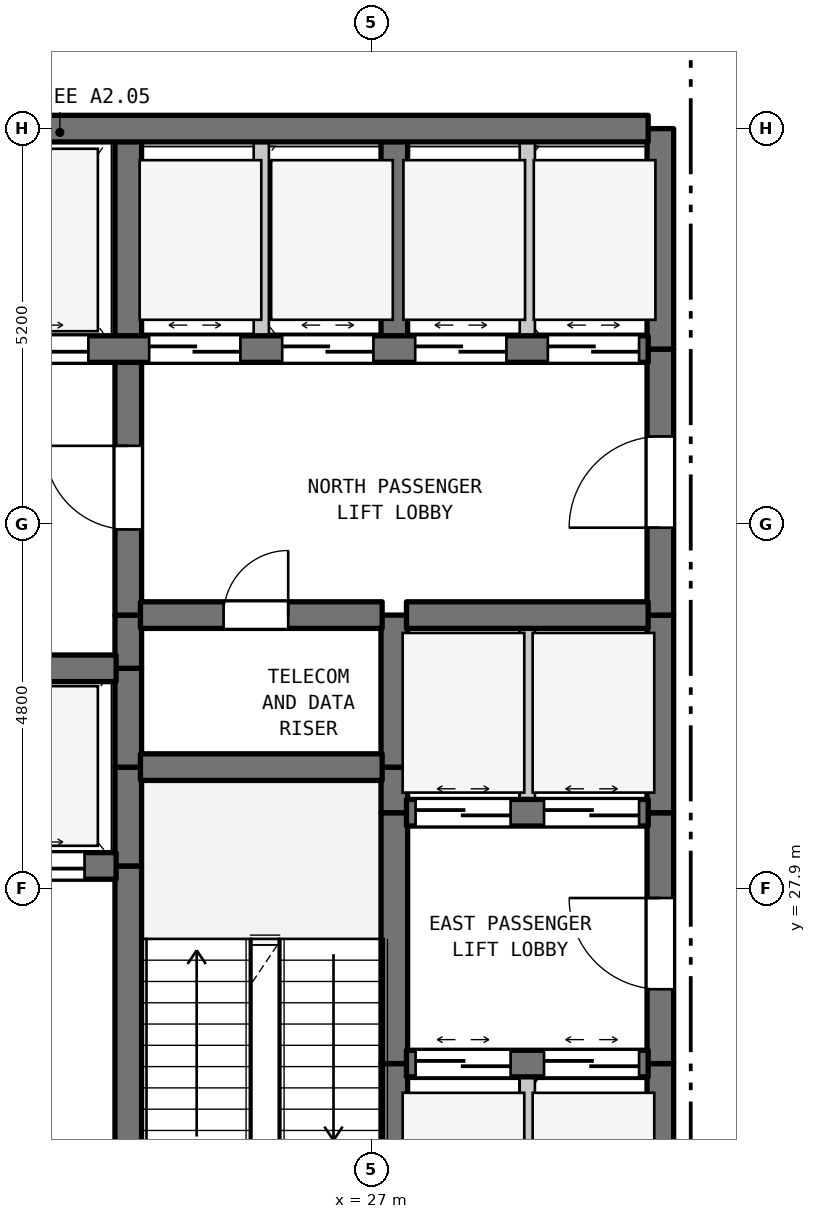
"""IFC4 building model, lengths in metres.
Left out: names, types, materials, properties, quantities, classifications, styles, units other than length and angle.
Written with IfcOpenShell. Run it as: python <this file> out.ifc"""

import sys

from ifc_helpers import new_model, si_unit, direction, frame, frame_2d, origin, place, context, subcontext, project, spatial, rectangle, extrude, element, fill, save


model = new_model("IFC4")
c1 = context("Model", 3, precision=1e-05, world=origin(), true_north=direction((0.0, 1.0)))
c2 = subcontext(c1, "Body", "Model", "MODEL_VIEW")
j1 = project(units=[si_unit("LENGTHUNIT", "METRE"), si_unit("PLANEANGLEUNIT", "RADIAN")], contexts=[c1])
p1 = place(None, origin())
s1 = spatial("IfcSite", under=j1, at=p1, CompositionType="ELEMENT")
p2 = place(p1, origin())
s2 = spatial("IfcBuilding", under=s1, at=p2, CompositionType="ELEMENT")
p3 = place(p2, frame((0.0, 0.0, 113.1)))
s3 = spatial("IfcBuildingStorey", under=s2, at=p3, CompositionType="ELEMENT", Elevation=113.1)
p4 = place(p3, frame((23.8, 22.7, 0.0), z_axis=(0.0, 0.0, 1.0), x_axis=(0.0, 1.0, 0.0)))
e1 = element("IfcWall", 1, at=p4, inside=s3, PredefinedType="SHEAR", context=c2, shape_type="SweptSolid", body=[
    extrude(rectangle(XDim=5.5, YDim=0.35, at=frame_2d((2.75, 0.0))), origin(), (0.0, 0.0, 1.0), 3.385),
])
p5 = place(p4, frame((0.235, 0.0, 0.0)))
e2 = element("IfcOpeningElement", 2, at=p5, cuts=e1, PredefinedType="OPENING", context=c2, shape_type="SweptSolid", body=[
    extrude(rectangle(XDim=1.1, YDim=2.15, at=frame_2d((0.55, 1.075))), frame((0.0, 0.185, 0.0), z_axis=(0.0, -1.0, 0.0), x_axis=(1.0, 0.0, 0.0)), (0.0, 0.0, 1.0), 0.37),
])
for number, where, z_axis, x_axis in (
    (3, (23.8, 28.2, 0.0), (0.0, 0.0, 1.0), (0.0, 1.0, 0.0)),
    (4, (23.8, 29.5, 0.0), (0.0, 0.0, 1.0), (0.0, 1.0, 0.0)),
):
    element("IfcWall", number, at=place(p3, frame(where, z_axis=z_axis, x_axis=x_axis)), inside=s3, PredefinedType="SHEAR", context=c2, shape_type="SweptSolid", body=[
        extrude(rectangle(XDim=1.3, YDim=0.35, at=frame_2d((0.65, 0.0))), origin(), (0.0, 0.0, 1.0), 3.385),
    ])
p6 = place(p3, frame((23.8, 30.8, 0.0), z_axis=(0.0, 0.0, 1.0), x_axis=(0.0, 1.0, 0.0)))
e5 = element("IfcWall", 5, at=p6, inside=s3, PredefinedType="SHEAR", context=c2, shape_type="SweptSolid", body=[
    extrude(rectangle(XDim=0.7, YDim=0.35, at=frame_2d((0.35, 0.0))), origin(), (0.0, 0.0, 1.0), 3.385),
])
p7 = place(p3, frame((23.8, 31.5, 0.0), z_axis=(0.0, 0.0, 1.0), x_axis=(0.0, 1.0, 0.0)))
e6 = element("IfcWall", 6, at=p7, inside=s3, PredefinedType="SHEAR", context=c2, shape_type="SweptSolid", body=[
    extrude(rectangle(XDim=3.5, YDim=0.35, at=frame_2d((1.75, 0.0))), origin(), (0.0, 0.0, 1.0), 3.385),
])
p8 = place(p7, frame((1.127, 0.0, 0.0)))
e7 = element("IfcOpeningElement", 7, at=p8, cuts=e6, PredefinedType="OPENING", context=c2, shape_type="SweptSolid", body=[
    extrude(rectangle(XDim=1.1, YDim=2.15, at=frame_2d((0.55, 1.075))), frame((0.0, 0.185, 0.0), z_axis=(0.0, -1.0, 0.0), x_axis=(1.0, 0.0, 0.0)), (0.0, 0.0, 1.0), 0.37),
])
p9 = place(p3, frame((23.8, 35.0, 0.0), z_axis=(0.0, 0.0, 1.0), x_axis=(0.0, 1.0, 0.0)))
e8 = element("IfcWall", 8, at=p9, inside=s3, PredefinedType="SHEAR", context=c2, shape_type="SweptSolid", body=[
    extrude(rectangle(XDim=2.9, YDim=0.35, at=frame_2d((1.45, 0.0))), origin(), (0.0, 0.0, 1.0), 3.385),
])
p10 = place(p3, frame((25.55, 35.0, 0.0), z_axis=(0.0, 0.0, 1.0), x_axis=(0.0, 1.0, 0.0)))
e9 = element("IfcWall", 9, at=p10, inside=s3, PredefinedType="STANDARD", context=c2, shape_type="SweptSolid", body=[
    extrude(rectangle(XDim=2.9, YDim=0.2, at=frame_2d((1.45, 0.0))), origin(), (0.0, 0.0, 1.0), 3.385),
])
p11 = place(p3, frame((27.3, 22.7, 0.0), z_axis=(0.0, 0.0, 1.0), x_axis=(0.0, 1.0, 0.0)))
e10 = element("IfcWall", 10, at=p11, inside=s3, PredefinedType="SHEAR", context=c2, shape_type="SweptSolid", body=[
    extrude(rectangle(XDim=2.9, YDim=0.35, at=frame_2d((1.45, 0.0))), origin(), (0.0, 0.0, 1.0), 3.385),
])
p12 = place(p3, frame((27.3, 25.6, 0.0), z_axis=(0.0, 0.0, 1.0), x_axis=(0.0, 1.0, 0.0)))
e11 = element("IfcWall", 11, at=p12, inside=s3, PredefinedType="SHEAR", context=c2, shape_type="SweptSolid", body=[
    extrude(rectangle(XDim=3.3, YDim=0.35, at=frame_2d((1.65, 0.0))), origin(), (0.0, 0.0, 1.0), 3.385),
])
p13 = place(p3, frame((27.3, 28.9, 0.0), z_axis=(0.0, 0.0, 1.0), x_axis=(0.0, 1.0, 0.0)))
e12 = element("IfcWall", 12, at=p13, inside=s3, PredefinedType="SHEAR", context=c2, shape_type="SweptSolid", body=[
    extrude(rectangle(XDim=0.6, YDim=0.35, at=frame_2d((0.3, 0.0))), origin(), (0.0, 0.0, 1.0), 3.385),
])
p14 = place(p3, frame((27.3, 29.5, 0.0), z_axis=(0.0, 0.0, 1.0), x_axis=(0.0, 1.0, 0.0)))
e13 = element("IfcWall", 13, at=p14, inside=s3, PredefinedType="SHEAR", context=c2, shape_type="SweptSolid", body=[
    extrude(rectangle(XDim=2.0, YDim=0.35, at=frame_2d((1.0, 0.0))), origin(), (0.0, 0.0, 1.0), 3.385),
])
p15 = place(p3, frame((27.3, 35.0, 0.0), z_axis=(0.0, 0.0, 1.0), x_axis=(0.0, 1.0, 0.0)))
e14 = element("IfcWall", 14, at=p15, inside=s3, PredefinedType="SHEAR", context=c2, shape_type="SweptSolid", body=[
    extrude(rectangle(XDim=2.9, YDim=0.35, at=frame_2d((1.45, 0.0))), origin(), (0.0, 0.0, 1.0), 3.385),
])
p16 = place(p3, frame((29.05, 22.7, 0.0), z_axis=(0.0, 0.0, 1.0), x_axis=(0.0, 1.0, 0.0)))
e15 = element("IfcWall", 15, at=p16, inside=s3, PredefinedType="STANDARD", context=c2, shape_type="SweptSolid", body=[
    extrude(rectangle(XDim=2.9, YDim=0.2, at=frame_2d((1.45, 0.0))), origin(), (0.0, 0.0, 1.0), 3.385),
])
p17 = place(p3, frame((29.05, 28.9, 0.0), z_axis=(0.0, 0.0, 1.0), x_axis=(0.0, 1.0, 0.0)))
e16 = element("IfcWall", 16, at=p17, inside=s3, PredefinedType="STANDARD", context=c2, shape_type="SweptSolid", body=[
    extrude(rectangle(XDim=2.6, YDim=0.2, at=frame_2d((1.3, 0.0))), origin(), (0.0, 0.0, 1.0), 3.385),
])
p18 = place(p3, frame((29.05, 35.0, 0.0), z_axis=(0.0, 0.0, 1.0), x_axis=(0.0, 1.0, 0.0)))
e17 = element("IfcWall", 17, at=p18, inside=s3, PredefinedType="STANDARD", context=c2, shape_type="SweptSolid", body=[
    extrude(rectangle(XDim=2.9, YDim=0.2, at=frame_2d((1.45, 0.0))), origin(), (0.0, 0.0, 1.0), 3.385),
])
p19 = place(p3, frame((30.8, 22.7, 0.0), z_axis=(0.0, 0.0, 1.0), x_axis=(0.0, 1.0, 0.0)))
e18 = element("IfcWall", 18, at=p19, inside=s3, PredefinedType="SHEAR", context=c2, shape_type="SweptSolid", body=[
    extrude(rectangle(XDim=2.9, YDim=0.35, at=frame_2d((1.45, 0.0))), origin(), (0.0, 0.0, 1.0), 3.385),
])
p20 = place(p3, frame((30.8, 25.6, 0.0), z_axis=(0.0, 0.0, 1.0), x_axis=(0.0, 1.0, 0.0)))
e19 = element("IfcWall", 19, at=p20, inside=s3, PredefinedType="SHEAR", context=c2, shape_type="SweptSolid", body=[
    extrude(rectangle(XDim=3.3, YDim=0.35, at=frame_2d((1.65, 0.0))), origin(), (0.0, 0.0, 1.0), 3.385),
])
p21 = place(p20, frame((0.978, 0.0, 0.0)))
e20 = element("IfcOpeningElement", 20, at=p21, cuts=e19, PredefinedType="OPENING", context=c2, shape_type="SweptSolid", body=[
    extrude(rectangle(XDim=1.2, YDim=2.2, at=frame_2d((0.6, 1.1))), frame((0.0, 0.185, 0.0), z_axis=(0.0, -1.0, 0.0), x_axis=(1.0, 0.0, 0.0)), (0.0, 0.0, 1.0), 0.37),
])
p22 = place(p3, frame((30.8, 28.9, 0.0), z_axis=(0.0, 0.0, 1.0), x_axis=(0.0, 1.0, 0.0)))
e21 = element("IfcWall", 21, at=p22, inside=s3, PredefinedType="SHEAR", context=c2, shape_type="SweptSolid", body=[
    extrude(rectangle(XDim=2.6, YDim=0.35, at=frame_2d((1.3, 0.0))), origin(), (0.0, 0.0, 1.0), 3.385),
])
p23 = place(p3, frame((30.8, 31.5, 0.0), z_axis=(0.0, 0.0, 1.0), x_axis=(0.0, 1.0, 0.0)))
e22 = element("IfcWall", 22, at=p23, inside=s3, PredefinedType="SHEAR", context=c2, shape_type="SweptSolid", body=[
    extrude(rectangle(XDim=3.5, YDim=0.35, at=frame_2d((1.75, 0.0))), origin(), (0.0, 0.0, 1.0), 3.385),
])
p24 = place(p23, frame((1.15, 0.0, 0.0)))
e23 = element("IfcOpeningElement", 23, at=p24, cuts=e22, PredefinedType="OPENING", context=c2, shape_type="SweptSolid", body=[
    extrude(rectangle(XDim=1.2, YDim=2.2, at=frame_2d((0.6, 1.1))), frame((0.0, 0.185, 0.0), z_axis=(0.0, -1.0, 0.0), x_axis=(1.0, 0.0, 0.0)), (0.0, 0.0, 1.0), 0.37),
])
p25 = place(p3, frame((30.8, 35.0, 0.0), z_axis=(0.0, 0.0, 1.0), x_axis=(0.0, 1.0, 0.0)))
e24 = element("IfcWall", 24, at=p25, inside=s3, PredefinedType="SHEAR", context=c2, shape_type="SweptSolid", body=[
    extrude(rectangle(XDim=2.9, YDim=0.35, at=frame_2d((1.45, 0.0))), origin(), (0.0, 0.0, 1.0), 3.385),
])
p26 = place(p3, frame((27.46, 25.6, 0.0), z_axis=(0.0, 0.0, 1.0), x_axis=(1.0, 0.0, 0.0)))
e25 = element("IfcWall", 25, at=p26, inside=s3, PredefinedType="SHEAR", context=c2, shape_type="SweptSolid", body=[
    extrude(rectangle(XDim=3.18, YDim=0.35, at=frame_2d((1.59, 0.0))), origin(), (0.0, 0.0, 1.0), 3.385),
])
p27 = place(p26, frame((0.12, 0.0, 0.0)))
e26 = element("IfcOpeningElement", 26, at=p27, cuts=e25, PredefinedType="OPENING", context=c2, shape_type="SweptSolid", body=[
    extrude(rectangle(XDim=1.25, YDim=2.2, at=frame_2d((0.625, 1.1))), frame((0.0, 0.185, 0.0), z_axis=(0.0, -1.0, 0.0), x_axis=(1.0, 0.0, 0.0)), (0.0, 0.0, 1.0), 0.37),
])
p28 = place(p26, frame((1.81, 0.0, 0.0)))
e27 = element("IfcOpeningElement", 27, at=p28, cuts=e25, PredefinedType="OPENING", context=c2, shape_type="SweptSolid", body=[
    extrude(rectangle(XDim=1.25, YDim=2.2, at=frame_2d((0.625, 1.1))), frame((0.0, 0.185, 0.0), z_axis=(0.0, -1.0, 0.0), x_axis=(1.0, 0.0, 0.0)), (0.0, 0.0, 1.0), 0.37),
])
p29 = place(p3, frame((19.16, 28.2, 0.0), z_axis=(0.0, 0.0, 1.0), x_axis=(1.0, 0.0, 0.0)))
e28 = element("IfcWall", 28, at=p29, inside=s3, PredefinedType="SHEAR", context=c2, shape_type="SweptSolid", body=[
    extrude(rectangle(XDim=4.48, YDim=0.35, at=frame_2d((2.24, 0.0))), origin(), (0.0, 0.0, 1.0), 3.385),
])
p30 = place(p29, frame((0.415, 0.0, 0.0)))
e29 = element("IfcOpeningElement", 29, at=p30, cuts=e28, PredefinedType="OPENING", context=c2, shape_type="SweptSolid", body=[
    extrude(rectangle(XDim=1.25, YDim=2.2, at=frame_2d((0.625, 1.1))), frame((0.0, 0.185, 0.0), z_axis=(0.0, -1.0, 0.0), x_axis=(1.0, 0.0, 0.0)), (0.0, 0.0, 1.0), 0.37),
])
p31 = place(p29, frame((2.815, 0.0, 0.0)))
e30 = element("IfcOpeningElement", 30, at=p31, cuts=e28, PredefinedType="OPENING", context=c2, shape_type="SweptSolid", body=[
    extrude(rectangle(XDim=1.25, YDim=2.2, at=frame_2d((0.625, 1.1))), frame((0.0, 0.185, 0.0), z_axis=(0.0, -1.0, 0.0), x_axis=(1.0, 0.0, 0.0)), (0.0, 0.0, 1.0), 0.37),
])
p32 = place(p3, frame((27.46, 28.9, 0.0), z_axis=(0.0, 0.0, 1.0), x_axis=(1.0, 0.0, 0.0)))
e31 = element("IfcWall", 31, at=p32, inside=s3, PredefinedType="SHEAR", context=c2, shape_type="SweptSolid", body=[
    extrude(rectangle(XDim=3.18, YDim=0.35, at=frame_2d((1.59, 0.0))), origin(), (0.0, 0.0, 1.0), 3.385),
])
p33 = place(p32, frame((0.12, 0.0, 0.0)))
e32 = element("IfcOpeningElement", 32, at=p33, cuts=e31, PredefinedType="OPENING", context=c2, shape_type="SweptSolid", body=[
    extrude(rectangle(XDim=1.25, YDim=2.2, at=frame_2d((0.625, 1.1))), frame((0.0, 0.185, 0.0), z_axis=(0.0, -1.0, 0.0), x_axis=(1.0, 0.0, 0.0)), (0.0, 0.0, 1.0), 0.37),
])
p34 = place(p32, frame((1.81, 0.0, 0.0)))
e33 = element("IfcOpeningElement", 33, at=p34, cuts=e31, PredefinedType="OPENING", context=c2, shape_type="SweptSolid", body=[
    extrude(rectangle(XDim=1.25, YDim=2.2, at=frame_2d((0.625, 1.1))), frame((0.0, 0.185, 0.0), z_axis=(0.0, -1.0, 0.0), x_axis=(1.0, 0.0, 0.0)), (0.0, 0.0, 1.0), 0.37),
])
p35 = place(p3, frame((23.96, 29.5, 0.0), z_axis=(0.0, 0.0, 1.0), x_axis=(1.0, 0.0, 0.0)))
e34 = element("IfcWall", 34, at=p35, inside=s3, PredefinedType="SHEAR", context=c2, shape_type="SweptSolid", body=[
    extrude(rectangle(XDim=3.18, YDim=0.35, at=frame_2d((1.59, 0.0))), origin(), (0.0, 0.0, 1.0), 3.385),
])
p36 = place(p3, frame((19.16, 30.8, 0.0), z_axis=(0.0, 0.0, 1.0), x_axis=(1.0, 0.0, 0.0)))
e35 = element("IfcWall", 35, at=p36, inside=s3, PredefinedType="SHEAR", context=c2, shape_type="SweptSolid", body=[
    extrude(rectangle(XDim=4.48, YDim=0.35, at=frame_2d((2.24, 0.0))), origin(), (0.0, 0.0, 1.0), 3.385),
])
p37 = place(p3, frame((23.96, 31.5, 0.0), z_axis=(0.0, 0.0, 1.0), x_axis=(1.0, 0.0, 0.0)))
e36 = element("IfcWall", 36, at=p37, inside=s3, PredefinedType="SHEAR", context=c2, shape_type="SweptSolid", body=[
    extrude(rectangle(XDim=3.18, YDim=0.35, at=frame_2d((1.59, 0.0))), origin(), (0.0, 0.0, 1.0), 3.385),
])
p38 = place(p37, frame((1.094, 0.0, 0.0)))
e37 = element("IfcOpeningElement", 37, at=p38, cuts=e36, PredefinedType="OPENING", context=c2, shape_type="SweptSolid", body=[
    extrude(rectangle(XDim=0.85, YDim=2.1, at=frame_2d((0.425, 1.05))), frame((0.0, 0.185, 0.0), z_axis=(0.0, -1.0, 0.0), x_axis=(1.0, 0.0, 0.0)), (0.0, 0.0, 1.0), 0.37),
])
p39 = place(p3, frame((27.46, 31.5, 0.0), z_axis=(0.0, 0.0, 1.0), x_axis=(1.0, 0.0, 0.0)))
e38 = element("IfcWall", 38, at=p39, inside=s3, PredefinedType="SHEAR", context=c2, shape_type="SweptSolid", body=[
    extrude(rectangle(XDim=3.18, YDim=0.35, at=frame_2d((1.59, 0.0))), origin(), (0.0, 0.0, 1.0), 3.385),
])
p40 = place(p3, frame((19.16, 35.0, 0.0), z_axis=(0.0, 0.0, 1.0), x_axis=(1.0, 0.0, 0.0)))
e39 = element("IfcWall", 39, at=p40, inside=s3, PredefinedType="SHEAR", context=c2, shape_type="SweptSolid", body=[
    extrude(rectangle(XDim=11.48, YDim=0.35, at=frame_2d((5.74, 0.0))), origin(), (0.0, 0.0, 1.0), 3.385),
])
p41 = place(p40, frame((0.365, 0.0, 0.0)))
e40 = element("IfcOpeningElement", 40, at=p41, cuts=e39, PredefinedType="OPENING", context=c2, shape_type="SweptSolid", body=[
    extrude(rectangle(XDim=1.35, YDim=2.2, at=frame_2d((0.675, 1.1))), frame((0.0, 0.185, 0.0), z_axis=(0.0, -1.0, 0.0), x_axis=(1.0, 0.0, 0.0)), (0.0, 0.0, 1.0), 0.37),
])
p42 = place(p40, frame((2.765, 0.0, 0.0)))
e41 = element("IfcOpeningElement", 41, at=p42, cuts=e39, PredefinedType="OPENING", context=c2, shape_type="SweptSolid", body=[
    extrude(rectangle(XDim=1.35, YDim=2.2, at=frame_2d((0.675, 1.1))), frame((0.0, 0.185, 0.0), z_axis=(0.0, -1.0, 0.0), x_axis=(1.0, 0.0, 0.0)), (0.0, 0.0, 1.0), 0.37),
])
p43 = place(p40, frame((4.915, 0.0, 0.0)))
e42 = element("IfcOpeningElement", 42, at=p43, cuts=e39, PredefinedType="OPENING", context=c2, shape_type="SweptSolid", body=[
    extrude(rectangle(XDim=1.2, YDim=2.2, at=frame_2d((0.6, 1.1))), frame((0.0, 0.185, 0.0), z_axis=(0.0, -1.0, 0.0), x_axis=(1.0, 0.0, 0.0)), (0.0, 0.0, 1.0), 0.37),
])
p44 = place(p40, frame((6.665, 0.0, 0.0)))
e43 = element("IfcOpeningElement", 43, at=p44, cuts=e39, PredefinedType="OPENING", context=c2, shape_type="SweptSolid", body=[
    extrude(rectangle(XDim=1.2, YDim=2.2, at=frame_2d((0.6, 1.1))), frame((0.0, 0.185, 0.0), z_axis=(0.0, -1.0, 0.0), x_axis=(1.0, 0.0, 0.0)), (0.0, 0.0, 1.0), 0.37),
])
p45 = place(p40, frame((8.415, 0.0, 0.0)))
e44 = element("IfcOpeningElement", 44, at=p45, cuts=e39, PredefinedType="OPENING", context=c2, shape_type="SweptSolid", body=[
    extrude(rectangle(XDim=1.2, YDim=2.2, at=frame_2d((0.6, 1.1))), frame((0.0, 0.185, 0.0), z_axis=(0.0, -1.0, 0.0), x_axis=(1.0, 0.0, 0.0)), (0.0, 0.0, 1.0), 0.37),
])
p46 = place(p40, frame((10.16, 0.0, 0.0)))
e45 = element("IfcOpeningElement", 45, at=p46, cuts=e39, PredefinedType="OPENING", context=c2, shape_type="SweptSolid", body=[
    extrude(rectangle(XDim=1.2, YDim=2.2, at=frame_2d((0.6, 1.1))), frame((0.0, 0.185, 0.0), z_axis=(0.0, -1.0, 0.0), x_axis=(1.0, 0.0, 0.0)), (0.0, 0.0, 1.0), 0.37),
])
p47 = place(p3, frame((19.16, 37.9, 0.0), z_axis=(0.0, 0.0, 1.0), x_axis=(1.0, 0.0, 0.0)))
e46 = element("IfcWall", 46, at=p47, inside=s3, PredefinedType="SHEAR", context=c2, shape_type="SweptSolid", body=[
    extrude(rectangle(XDim=11.48, YDim=0.35, at=frame_2d((5.74, 0.0))), origin(), (0.0, 0.0, 1.0), 3.385),
])
p48 = place(p8, origin())
e47 = element("IfcDoor", 47, at=p48, inside=s3, OperationType="SINGLE_SWING_RIGHT", PredefinedType="DOOR", context=c2, shape_type="SweptSolid", body=[
    extrude(rectangle(XDim=1.1, YDim=2.15, at=frame_2d((0.55, 1.075))), frame((0.0, 0.025, 0.0), z_axis=(0.0, -1.0, 0.0), x_axis=(1.0, 0.0, 0.0)), (0.0, 0.0, 1.0), 0.05),
])
fill(e7, e47)
p49 = place(p21, origin())
e48 = element("IfcDoor", 48, at=p49, inside=s3, OperationType="SINGLE_SWING_RIGHT", PredefinedType="DOOR", context=c2, shape_type="SweptSolid", body=[
    extrude(rectangle(XDim=1.2, YDim=2.2, at=frame_2d((0.6, 1.1))), frame((0.0, 0.025, 0.0), z_axis=(0.0, -1.0, 0.0), x_axis=(1.0, 0.0, 0.0)), (0.0, 0.0, 1.0), 0.05),
])
fill(e20, e48)
p50 = place(p24, origin())
e49 = element("IfcDoor", 49, at=p50, inside=s3, OperationType="SINGLE_SWING_LEFT", PredefinedType="DOOR", context=c2, shape_type="SweptSolid", body=[
    extrude(rectangle(XDim=1.2, YDim=2.2, at=frame_2d((0.6, 1.1))), frame((0.0, 0.025, 0.0), z_axis=(0.0, -1.0, 0.0), x_axis=(1.0, 0.0, 0.0)), (0.0, 0.0, 1.0), 0.05),
])
fill(e23, e49)
p51 = place(p27, origin())
e50 = element("IfcDoor", 50, at=p51, inside=s3, OperationType="DOUBLE_DOOR_SLIDING", PredefinedType="DOOR", context=c2, shape_type="SweptSolid", body=[
    extrude(rectangle(XDim=1.25, YDim=2.2, at=frame_2d((0.625, 1.1))), frame((0.0, 0.025, 0.0), z_axis=(0.0, -1.0, 0.0), x_axis=(1.0, 0.0, 0.0)), (0.0, 0.0, 1.0), 0.05),
])
fill(e26, e50)
p52 = place(p28, origin())
e51 = element("IfcDoor", 51, at=p52, inside=s3, OperationType="DOUBLE_DOOR_SLIDING", PredefinedType="DOOR", context=c2, shape_type="SweptSolid", body=[
    extrude(rectangle(XDim=1.25, YDim=2.2, at=frame_2d((0.625, 1.1))), frame((0.0, 0.025, 0.0), z_axis=(0.0, -1.0, 0.0), x_axis=(1.0, 0.0, 0.0)), (0.0, 0.0, 1.0), 0.05),
])
fill(e27, e51)
p53 = place(p31, origin())
e52 = element("IfcDoor", 52, at=p53, inside=s3, OperationType="DOUBLE_DOOR_SLIDING", PredefinedType="DOOR", context=c2, shape_type="SweptSolid", body=[
    extrude(rectangle(XDim=1.25, YDim=2.2, at=frame_2d((0.625, 1.1))), frame((0.0, 0.025, 0.0), z_axis=(0.0, -1.0, 0.0), x_axis=(1.0, 0.0, 0.0)), (0.0, 0.0, 1.0), 0.05),
])
fill(e30, e52)
p54 = place(p33, origin())
e53 = element("IfcDoor", 53, at=p54, inside=s3, OperationType="DOUBLE_DOOR_SLIDING", PredefinedType="DOOR", context=c2, shape_type="SweptSolid", body=[
    extrude(rectangle(XDim=1.25, YDim=2.2, at=frame_2d((0.625, 1.1))), frame((0.0, 0.025, 0.0), z_axis=(0.0, -1.0, 0.0), x_axis=(1.0, 0.0, 0.0)), (0.0, 0.0, 1.0), 0.05),
])
fill(e32, e53)
p55 = place(p34, origin())
e54 = element("IfcDoor", 54, at=p55, inside=s3, OperationType="DOUBLE_DOOR_SLIDING", PredefinedType="DOOR", context=c2, shape_type="SweptSolid", body=[
    extrude(rectangle(XDim=1.25, YDim=2.2, at=frame_2d((0.625, 1.1))), frame((0.0, 0.025, 0.0), z_axis=(0.0, -1.0, 0.0), x_axis=(1.0, 0.0, 0.0)), (0.0, 0.0, 1.0), 0.05),
])
fill(e33, e54)
p56 = place(p38, origin())
e55 = element("IfcDoor", 55, at=p56, inside=s3, OperationType="SINGLE_SWING_RIGHT", PredefinedType="DOOR", context=c2, shape_type="SweptSolid", body=[
    extrude(rectangle(XDim=0.85, YDim=2.1, at=frame_2d((0.425, 1.05))), frame((0.0, 0.025, 0.0), z_axis=(0.0, -1.0, 0.0), x_axis=(1.0, 0.0, 0.0)), (0.0, 0.0, 1.0), 0.05),
])
fill(e37, e55)
p57 = place(p42, origin())
e56 = element("IfcDoor", 56, at=p57, inside=s3, OperationType="DOUBLE_DOOR_SLIDING", PredefinedType="DOOR", context=c2, shape_type="SweptSolid", body=[
    extrude(rectangle(XDim=1.35, YDim=2.2, at=frame_2d((0.675, 1.1))), frame((0.0, 0.025, 0.0), z_axis=(0.0, -1.0, 0.0), x_axis=(1.0, 0.0, 0.0)), (0.0, 0.0, 1.0), 0.05),
])
fill(e41, e56)
p58 = place(p43, origin())
e57 = element("IfcDoor", 57, at=p58, inside=s3, OperationType="DOUBLE_DOOR_SLIDING", PredefinedType="DOOR", context=c2, shape_type="SweptSolid", body=[
    extrude(rectangle(XDim=1.2, YDim=2.2, at=frame_2d((0.6, 1.1))), frame((0.0, 0.025, 0.0), z_axis=(0.0, -1.0, 0.0), x_axis=(1.0, 0.0, 0.0)), (0.0, 0.0, 1.0), 0.05),
])
fill(e42, e57)
p59 = place(p44, origin())
e58 = element("IfcDoor", 58, at=p59, inside=s3, OperationType="DOUBLE_DOOR_SLIDING", PredefinedType="DOOR", context=c2, shape_type="SweptSolid", body=[
    extrude(rectangle(XDim=1.2, YDim=2.2, at=frame_2d((0.6, 1.1))), frame((0.0, 0.025, 0.0), z_axis=(0.0, -1.0, 0.0), x_axis=(1.0, 0.0, 0.0)), (0.0, 0.0, 1.0), 0.05),
])
fill(e43, e58)
p60 = place(p45, origin())
e59 = element("IfcDoor", 59, at=p60, inside=s3, OperationType="DOUBLE_DOOR_SLIDING", PredefinedType="DOOR", context=c2, shape_type="SweptSolid", body=[
    extrude(rectangle(XDim=1.2, YDim=2.2, at=frame_2d((0.6, 1.1))), frame((0.0, 0.025, 0.0), z_axis=(0.0, -1.0, 0.0), x_axis=(1.0, 0.0, 0.0)), (0.0, 0.0, 1.0), 0.05),
])
fill(e44, e59)
p61 = place(p46, origin())
e60 = element("IfcDoor", 60, at=p61, inside=s3, OperationType="DOUBLE_DOOR_SLIDING", PredefinedType="DOOR", context=c2, shape_type="SweptSolid", body=[
    extrude(rectangle(XDim=1.2, YDim=2.2, at=frame_2d((0.6, 1.1))), frame((0.0, 0.025, 0.0), z_axis=(0.0, -1.0, 0.0), x_axis=(1.0, 0.0, 0.0)), (0.0, 0.0, 1.0), 0.05),
])
fill(e45, e60)
save(model, sys.argv[1])
